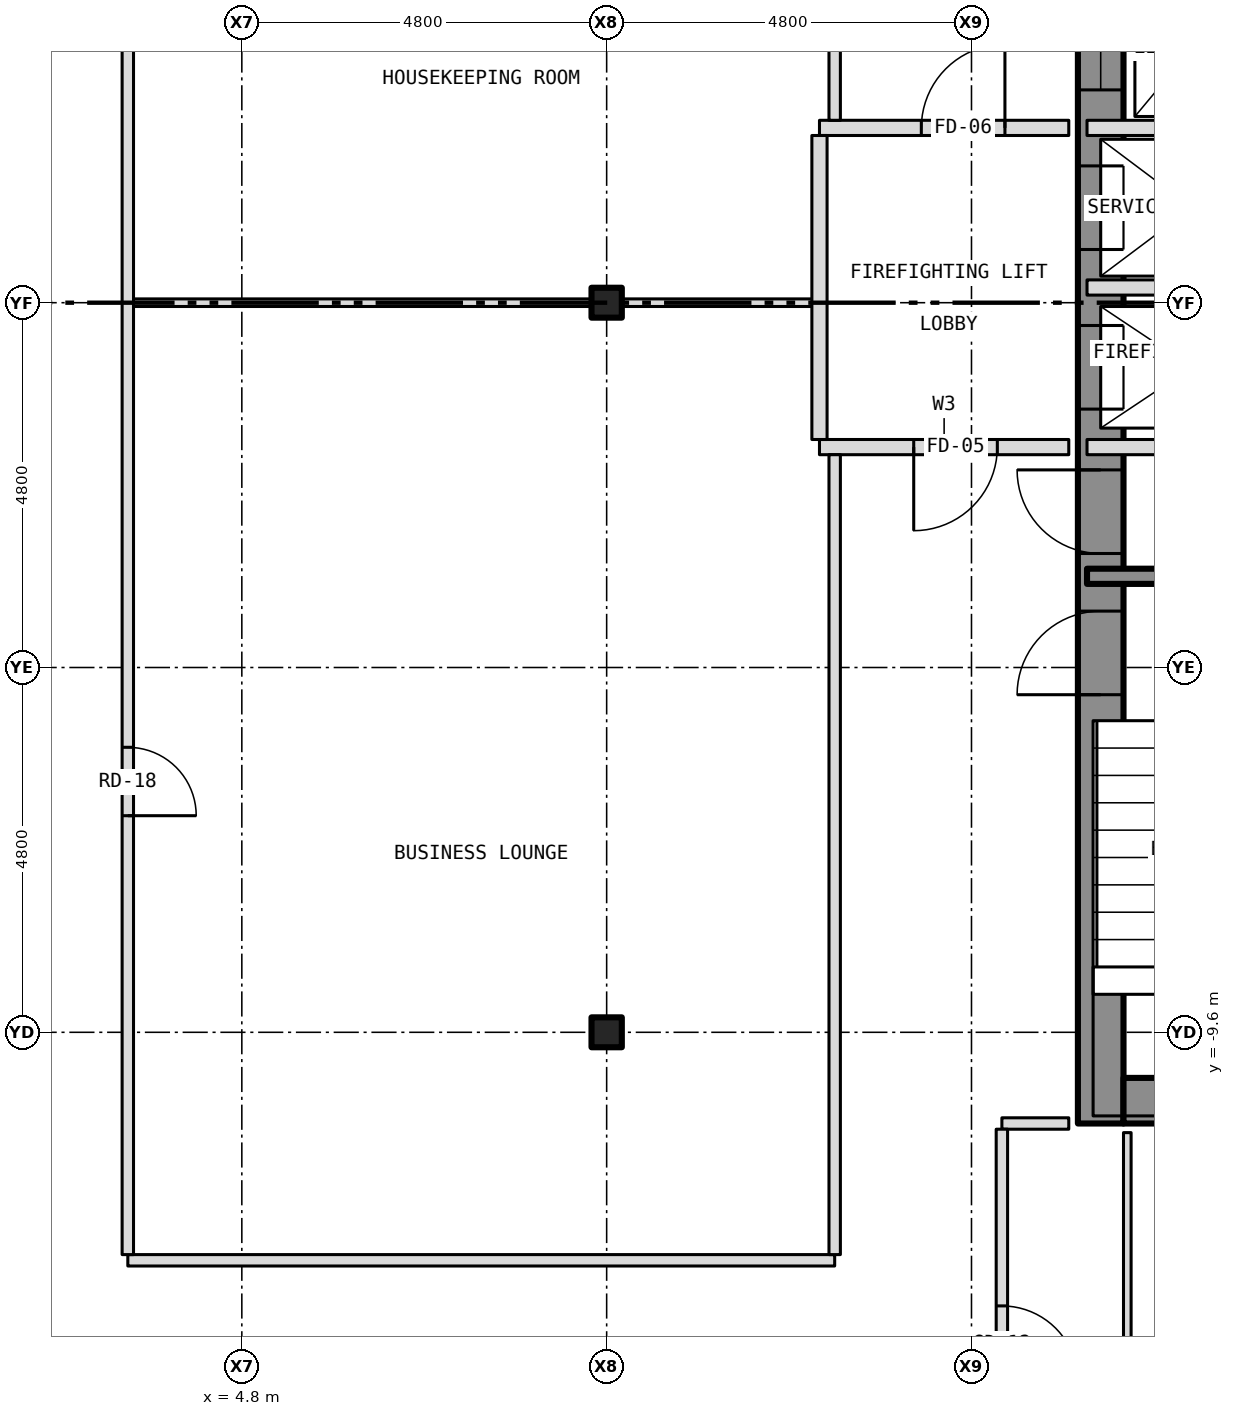
"""IFC4 building model, lengths in metres.
Left out: names, types, materials, properties, quantities, classifications, styles, units other than length and angle.
Written with IfcOpenShell. Run it as: python <this file> out.ifc"""

import sys

from ifc_helpers import new_model, si_unit, direction, frame, frame_2d, origin, origin_2d, place, context, subcontext, project, spatial, rectangle, i_section, extrude, element, fill, save


model = new_model("IFC4")
c1 = context("Model", 3, precision=1e-05, world=origin(), true_north=direction((0.0, 1.0)))
c2 = subcontext(c1, "Body", "Model", "MODEL_VIEW")
j1 = project(units=[si_unit("LENGTHUNIT", "METRE"), si_unit("PLANEANGLEUNIT", "RADIAN")], contexts=[c1])
p1 = place(None, origin())
s1 = spatial("IfcSite", under=j1, at=p1, CompositionType="ELEMENT")
p2 = place(p1, origin())
s2 = spatial("IfcBuilding", under=s1, at=p2, CompositionType="ELEMENT")
p3 = place(p2, frame((0.0, 0.0, 92.5)))
s3 = spatial("IfcBuildingStorey", under=s2, at=p3, CompositionType="ELEMENT", Elevation=92.5)
for number, where, z_axis, x_axis in (
    (1, (9.6, -9.6, -0.15), (0.0, 0.0, 1.0), (1.0, 0.0, 0.0)),
    (2, (9.6, 0.0, -0.15), (0.0, 0.0, 1.0), (1.0, 0.0, 0.0)),
):
    element("IfcColumn", number, at=place(p3, frame(where, z_axis=z_axis, x_axis=x_axis)), inside=s3, PredefinedType="COLUMN", context=c2, shape_type="SweptSolid", body=[
        extrude(i_section(OverallWidth=0.399, OverallDepth=0.394, WebThickness=0.023, FlangeThickness=0.037, at=origin_2d()), origin(), (0.0, 0.0, 1.0), 3.5),
    ])
p4 = place(p3, frame((16.1, -10.8, 0.0), z_axis=(0.0, 0.0, 1.0), x_axis=(0.0, 1.0, 0.0)))
e3 = element("IfcWall", 3, at=p4, inside=s3, PredefinedType="SHEAR", context=c2, shape_type="SweptSolid", body=[
    extrude(rectangle(XDim=21.6, YDim=0.6, at=frame_2d((10.8, 0.0))), origin(), (0.0, 0.0, 1.0), 3.25),
])
p5 = place(p4, frame((9.4, 0.0, 0.0)))
e4 = element("IfcOpeningElement", 4, at=p5, cuts=e3, PredefinedType="OPENING", context=c2, shape_type="SweptSolid", body=[
    extrude(rectangle(XDim=1.1, YDim=2.1, at=frame_2d((0.55, 1.05))), frame((0.0, 0.312, 0.0), z_axis=(0.0, -1.0, 0.0), x_axis=(1.0, 0.0, 0.0)), (0.0, 0.0, 1.0), 0.624),
])
p6 = place(p4, frame((11.5, 0.0, 0.0)))
e5 = element("IfcOpeningElement", 5, at=p6, cuts=e3, PredefinedType="OPENING", context=c2, shape_type="SweptSolid", body=[
    extrude(rectangle(XDim=1.1, YDim=2.1, at=frame_2d((0.55, 1.05))), frame((0.0, 0.312, 0.0), z_axis=(0.0, -1.0, 0.0), x_axis=(1.0, 0.0, 0.0)), (0.0, 0.0, 1.0), 0.624),
])
p7 = place(p4, frame((13.6, 0.0, 0.0)))
e6 = element("IfcOpeningElement", 6, at=p7, cuts=e3, PredefinedType="OPENING", context=c2, shape_type="SweptSolid", body=[
    extrude(rectangle(XDim=1.1, YDim=2.1, at=frame_2d((0.55, 1.05))), frame((0.0, 0.312, 0.0), z_axis=(0.0, -1.0, 0.0), x_axis=(1.0, 0.0, 0.0)), (0.0, 0.0, 1.0), 0.624),
])
p8 = place(p4, frame((15.7, 0.0, 0.0)))
e7 = element("IfcOpeningElement", 7, at=p8, cuts=e3, PredefinedType="OPENING", context=c2, shape_type="SweptSolid", body=[
    extrude(rectangle(XDim=1.1, YDim=2.1, at=frame_2d((0.55, 1.05))), frame((0.0, 0.312, 0.0), z_axis=(0.0, -1.0, 0.0), x_axis=(1.0, 0.0, 0.0)), (0.0, 0.0, 1.0), 0.624),
])
p9 = place(p4, frame((17.8, 0.0, 0.0)))
e8 = element("IfcOpeningElement", 8, at=p9, cuts=e3, PredefinedType="OPENING", context=c2, shape_type="SweptSolid", body=[
    extrude(rectangle(XDim=1.1, YDim=2.1, at=frame_2d((0.55, 1.05))), frame((0.0, 0.312, 0.0), z_axis=(0.0, -1.0, 0.0), x_axis=(1.0, 0.0, 0.0)), (0.0, 0.0, 1.0), 0.624),
])
p10 = place(p4, frame((5.642, 0.0, 0.0)))
e9 = element("IfcOpeningElement", 9, at=p10, cuts=e3, PredefinedType="OPENING", context=c2, shape_type="SweptSolid", body=[
    extrude(rectangle(XDim=1.1, YDim=2.1, at=frame_2d((0.55, 1.05))), frame((0.0, 0.312, 0.0), z_axis=(0.0, -1.0, 0.0), x_axis=(1.0, 0.0, 0.0)), (0.0, 0.0, 1.0), 0.624),
])
p11 = place(p4, frame((7.5, 0.0, 0.0)))
e10 = element("IfcOpeningElement", 10, at=p11, cuts=e3, PredefinedType="OPENING", context=c2, shape_type="SweptSolid", body=[
    extrude(rectangle(XDim=1.1, YDim=2.1, at=frame_2d((0.55, 1.05))), frame((0.0, 0.312, 0.0), z_axis=(0.0, -1.0, 0.0), x_axis=(1.0, 0.0, 0.0)), (0.0, 0.0, 1.0), 0.624),
])
p12 = place(p3, frame((16.4, -10.5, 0.0), z_axis=(0.0, 0.0, 1.0), x_axis=(1.0, 0.0, 0.0)))
e11 = element("IfcWall", 11, at=p12, inside=s3, PredefinedType="SHEAR", context=c2, shape_type="SweptSolid", body=[
    extrude(rectangle(XDim=5.8, YDim=0.6, at=frame_2d((2.9, 0.0))), origin(), (0.0, 0.0, 1.0), 3.25),
])
p13 = place(p3, frame((3.3, -12.6, 0.0), z_axis=(0.0, 0.0, 1.0), x_axis=(1.0, 0.0, 0.0)))
e12 = element("IfcWall", 12, at=p13, inside=s3, PredefinedType="PARTITIONING", context=c2, shape_type="SweptSolid", body=[
    extrude(rectangle(XDim=9.3, YDim=0.15, at=frame_2d((4.65, 0.0))), origin(), (0.0, 0.0, 1.0), 3.35),
])
p14 = place(p3, frame((14.8, -10.8, 0.0), z_axis=(0.0, 0.0, 1.0), x_axis=(1.0, 0.0, 0.0)))
e13 = element("IfcWall", 13, at=p14, inside=s3, PredefinedType="PARTITIONING", context=c2, shape_type="SweptSolid", body=[
    extrude(rectangle(XDim=0.88, YDim=0.15, at=frame_2d((0.44, 0.0))), origin(), (0.0, 0.0, 1.0), 3.35),
])
p15 = place(p3, frame((15.92, -3.6, 0.0), z_axis=(0.0, 0.0, 1.0), x_axis=(1.0, 0.0, 0.0)))
e14 = element("IfcWall", 14, at=p15, inside=s3, PredefinedType="SHEAR", context=c2, shape_type="SweptSolid", body=[
    extrude(rectangle(XDim=4.08, YDim=0.2, at=frame_2d((2.04, 0.0))), origin(), (0.0, 0.0, 1.0), 3.25),
])
p16 = place(p3, frame((12.4, -1.9, 0.0), z_axis=(0.0, 0.0, 1.0), x_axis=(1.0, 0.0, 0.0)))
e15 = element("IfcWall", 15, at=p16, inside=s3, PredefinedType="PARTITIONING", context=c2, shape_type="SweptSolid", body=[
    extrude(rectangle(XDim=3.28, YDim=0.2, at=frame_2d((1.64, 0.0))), origin(), (0.0, 0.0, 1.0), 3.35),
])
p17 = place(p16, frame((1.24, 0.0, 0.0)))
e16 = element("IfcOpeningElement", 16, at=p17, cuts=e15, PredefinedType="OPENING", context=c2, shape_type="SweptSolid", body=[
    extrude(rectangle(XDim=1.1, YDim=2.1, at=frame_2d((0.55, 1.05))), frame((0.0, 0.112, 0.0), z_axis=(0.0, -1.0, 0.0), x_axis=(1.0, 0.0, 0.0)), (0.0, 0.0, 1.0), 0.224),
])
p18 = place(p3, frame((15.92, -1.9, 0.0), z_axis=(0.0, 0.0, 1.0), x_axis=(1.0, 0.0, 0.0)))
e17 = element("IfcWall", 17, at=p18, inside=s3, PredefinedType="PARTITIONING", context=c2, shape_type="SweptSolid", body=[
    extrude(rectangle(XDim=6.76, YDim=0.2, at=frame_2d((3.38, 0.0))), origin(), (0.0, 0.0, 1.0), 3.25),
])
p19 = place(p18, frame((3.74, 0.0, 0.0)))
e18 = element("IfcOpeningElement", 18, at=p19, cuts=e17, PredefinedType="OPENING", context=c2, shape_type="SweptSolid", body=[
    extrude(rectangle(XDim=0.9, YDim=2.1, at=frame_2d((0.45, 1.05))), frame((0.0, 0.112, 0.0), z_axis=(0.0, -1.0, 0.0), x_axis=(1.0, 0.0, 0.0)), (0.0, 0.0, 1.0), 0.224),
])
p20 = place(p3, frame((3.3, 0.0, 0.0), z_axis=(0.0, 0.0, 1.0), x_axis=(1.0, 0.0, 0.0)))
e19 = element("IfcWall", 19, at=p20, inside=s3, PredefinedType="PARTITIONING", context=c2, shape_type="SweptSolid", body=[
    extrude(rectangle(XDim=6.101, YDim=0.1, at=frame_2d((3.05, 0.0))), origin(), (0.0, 0.0, 1.0), 2.728),
])
p21 = place(p3, frame((9.401, 0.0, 0.0), z_axis=(0.0, 0.0, 1.0), x_axis=(1.0, 0.0, 0.0)))
e20 = element("IfcWall", 20, at=p21, inside=s3, PredefinedType="PARTITIONING", context=c2, shape_type="SweptSolid", body=[
    extrude(rectangle(XDim=0.398, YDim=0.1, at=frame_2d((0.199, 0.0))), origin(), (0.0, 0.0, 1.0), 3.35),
])
p22 = place(p3, frame((9.799, 0.0, 0.0), z_axis=(0.0, 0.0, 1.0), x_axis=(1.0, 0.0, 0.0)))
e21 = element("IfcWall", 21, at=p22, inside=s3, PredefinedType="PARTITIONING", context=c2, shape_type="SweptSolid", body=[
    extrude(rectangle(XDim=2.601, YDim=0.1, at=frame_2d((1.3, 0.0))), origin(), (0.0, 0.0, 1.0), 2.728),
])
p23 = place(p3, frame((15.92, 0.2, 0.0), z_axis=(0.0, 0.0, 1.0), x_axis=(1.0, 0.0, 0.0)))
e22 = element("IfcWall", 22, at=p23, inside=s3, PredefinedType="PARTITIONING", context=c2, shape_type="SweptSolid", body=[
    extrude(rectangle(XDim=2.88, YDim=0.2, at=frame_2d((1.44, 0.0))), origin(), (0.0, 0.0, 1.0), 3.25),
])
p24 = place(p3, frame((12.4, 2.3, 0.0), z_axis=(0.0, 0.0, 1.0), x_axis=(1.0, 0.0, 0.0)))
e23 = element("IfcWall", 23, at=p24, inside=s3, PredefinedType="PARTITIONING", context=c2, shape_type="SweptSolid", body=[
    extrude(rectangle(XDim=3.28, YDim=0.2, at=frame_2d((1.64, 0.0))), origin(), (0.0, 0.0, 1.0), 3.35),
])
p25 = place(p24, frame((1.34, 0.0, 0.0)))
e24 = element("IfcOpeningElement", 24, at=p25, cuts=e23, PredefinedType="OPENING", context=c2, shape_type="SweptSolid", body=[
    extrude(rectangle(XDim=1.1, YDim=2.1, at=frame_2d((0.55, 1.05))), frame((0.0, 0.112, 0.0), z_axis=(0.0, -1.0, 0.0), x_axis=(1.0, 0.0, 0.0)), (0.0, 0.0, 1.0), 0.224),
])
p26 = place(p3, frame((15.92, 2.3, 0.0), z_axis=(0.0, 0.0, 1.0), x_axis=(1.0, 0.0, 0.0)))
e25 = element("IfcWall", 25, at=p26, inside=s3, PredefinedType="PARTITIONING", context=c2, shape_type="SweptSolid", body=[
    extrude(rectangle(XDim=2.88, YDim=0.2, at=frame_2d((1.44, 0.0))), origin(), (0.0, 0.0, 1.0), 3.25),
])
p27 = place(p3, frame((3.3, -12.525, 0.0), z_axis=(0.0, 0.0, 1.0), x_axis=(0.0, 1.0, 0.0)))
e26 = element("IfcWall", 26, at=p27, inside=s3, PredefinedType="PARTITIONING", context=c2, shape_type="SweptSolid", body=[
    extrude(rectangle(XDim=18.35, YDim=0.15, at=frame_2d((9.175, 0.0))), origin(), (0.0, 0.0, 1.0), 3.35),
])
p28 = place(p27, frame((5.775, 0.0, 0.0)))
e27 = element("IfcOpeningElement", 27, at=p28, cuts=e26, PredefinedType="OPENING", context=c2, shape_type="SweptSolid", body=[
    extrude(rectangle(XDim=0.9, YDim=2.1, at=frame_2d((0.45, 1.05))), frame((0.0, 0.087, 0.0), z_axis=(0.0, -1.0, 0.0), x_axis=(1.0, 0.0, 0.0)), (0.0, 0.0, 1.0), 0.174),
])
p29 = place(p3, frame((12.4, -1.8, 0.0), z_axis=(0.0, 0.0, 1.0), x_axis=(0.0, 1.0, 0.0)))
e28 = element("IfcWall", 28, at=p29, inside=s3, PredefinedType="PARTITIONING", context=c2, shape_type="SweptSolid", body=[
    extrude(rectangle(XDim=4.0, YDim=0.2, at=frame_2d((2.0, 0.0))), origin(), (0.0, 0.0, 1.0), 3.35),
])
p30 = place(p3, frame((12.6, -12.525, 0.0), z_axis=(0.0, 0.0, 1.0), x_axis=(0.0, 1.0, 0.0)))
e29 = element("IfcWall", 29, at=p30, inside=s3, PredefinedType="PARTITIONING", context=c2, shape_type="SweptSolid", body=[
    extrude(rectangle(XDim=10.525, YDim=0.15, at=frame_2d((5.262, 0.0))), origin(), (0.0, 0.0, 1.0), 3.35),
])
p31 = place(p3, frame((12.6, 2.4, 0.0), z_axis=(0.0, 0.0, 1.0), x_axis=(0.0, 1.0, 0.0)))
e30 = element("IfcWall", 30, at=p31, inside=s3, PredefinedType="PARTITIONING", context=c2, shape_type="SweptSolid", body=[
    extrude(rectangle(XDim=3.425, YDim=0.15, at=frame_2d((1.712, 0.0))), origin(), (0.0, 0.0, 1.0), 3.35),
])
p32 = place(p3, frame((14.8, -14.725, 0.0), z_axis=(0.0, 0.0, 1.0), x_axis=(0.0, 1.0, 0.0)))
e31 = element("IfcWall", 31, at=p32, inside=s3, PredefinedType="PARTITIONING", context=c2, shape_type="SweptSolid", body=[
    extrude(rectangle(XDim=3.85, YDim=0.15, at=frame_2d((1.925, 0.0))), origin(), (0.0, 0.0, 1.0), 3.35),
])
p33 = place(p32, frame((0.525, 0.0, 0.0)))
e32 = element("IfcOpeningElement", 32, at=p33, cuts=e31, PredefinedType="OPENING", context=c2, shape_type="SweptSolid", body=[
    extrude(rectangle(XDim=1.0, YDim=2.1, at=frame_2d((0.5, 1.05))), frame((0.0, 0.087, 0.0), z_axis=(0.0, -1.0, 0.0), x_axis=(1.0, 0.0, 0.0)), (0.0, 0.0, 1.0), 0.174),
])
p34 = place(p3, frame((16.45, -23.28, 0.0), z_axis=(0.0, 0.0, 1.0), x_axis=(0.0, 1.0, 0.0)))
e33 = element("IfcWall", 33, at=p34, inside=s3, PredefinedType="PARTITIONING", context=c2, shape_type="SweptSolid", body=[
    extrude(rectangle(XDim=12.36, YDim=0.1, at=frame_2d((6.18, 0.0))), origin(), (0.0, 0.0, 1.0), 3.35),
])
p35 = place(p34, frame((6.03, 0.0, 0.0)))
e34 = element("IfcOpeningElement", 34, at=p35, cuts=e33, PredefinedType="OPENING", context=c2, shape_type="SweptSolid", body=[
    extrude(rectangle(XDim=0.9, YDim=2.1, at=frame_2d((0.45, 1.05))), frame((0.0, 0.062, 0.0), z_axis=(0.0, -1.0, 0.0), x_axis=(1.0, 0.0, 0.0)), (0.0, 0.0, 1.0), 0.124),
])
p36 = place(p5, origin())
e35 = element("IfcDoor", 35, at=p36, inside=s3, OperationType="SLIDING_TO_LEFT", PredefinedType="DOOR", context=c2, shape_type="SweptSolid", body=[
    extrude(rectangle(XDim=1.1, YDim=2.1, at=frame_2d((0.55, 1.05))), frame((0.0, 0.025, 0.0), z_axis=(0.0, -1.0, 0.0), x_axis=(1.0, 0.0, 0.0)), (0.0, 0.0, 1.0), 0.05),
])
fill(e4, e35)
p37 = place(p6, origin())
e36 = element("IfcDoor", 36, at=p37, inside=s3, OperationType="SLIDING_TO_LEFT", PredefinedType="DOOR", context=c2, shape_type="SweptSolid", body=[
    extrude(rectangle(XDim=1.1, YDim=2.1, at=frame_2d((0.55, 1.05))), frame((0.0, 0.025, 0.0), z_axis=(0.0, -1.0, 0.0), x_axis=(1.0, 0.0, 0.0)), (0.0, 0.0, 1.0), 0.05),
])
fill(e5, e36)
p38 = place(p7, origin())
e37 = element("IfcDoor", 37, at=p38, inside=s3, OperationType="SLIDING_TO_LEFT", PredefinedType="DOOR", context=c2, shape_type="SweptSolid", body=[
    extrude(rectangle(XDim=1.1, YDim=2.1, at=frame_2d((0.55, 1.05))), frame((0.0, 0.025, 0.0), z_axis=(0.0, -1.0, 0.0), x_axis=(1.0, 0.0, 0.0)), (0.0, 0.0, 1.0), 0.05),
])
fill(e6, e37)
p39 = place(p10, origin())
e38 = element("IfcDoor", 38, at=p39, inside=s3, OperationType="SINGLE_SWING_LEFT", PredefinedType="DOOR", context=c2, shape_type="SweptSolid", body=[
    extrude(rectangle(XDim=1.1, YDim=2.1, at=frame_2d((0.55, 1.05))), frame((0.0, 0.025, 0.0), z_axis=(0.0, -1.0, 0.0), x_axis=(1.0, 0.0, 0.0)), (0.0, 0.0, 1.0), 0.05),
])
fill(e9, e38)
p40 = place(p11, origin())
e39 = element("IfcDoor", 39, at=p40, inside=s3, OperationType="SINGLE_SWING_RIGHT", PredefinedType="DOOR", context=c2, shape_type="SweptSolid", body=[
    extrude(rectangle(XDim=1.1, YDim=2.1, at=frame_2d((0.55, 1.05))), frame((0.0, 0.025, 0.0), z_axis=(0.0, -1.0, 0.0), x_axis=(1.0, 0.0, 0.0)), (0.0, 0.0, 1.0), 0.05),
])
fill(e10, e39)
p41 = place(p17, origin())
e40 = element("IfcDoor", 40, at=p41, inside=s3, OperationType="SINGLE_SWING_LEFT", PredefinedType="DOOR", context=c2, shape_type="SweptSolid", body=[
    extrude(rectangle(XDim=1.1, YDim=2.1, at=frame_2d((0.55, 1.05))), frame((0.0, 0.025, 0.0), z_axis=(0.0, -1.0, 0.0), x_axis=(1.0, 0.0, 0.0)), (0.0, 0.0, 1.0), 0.05),
])
fill(e16, e40)
p42 = place(p25, origin())
e41 = element("IfcDoor", 41, at=p42, inside=s3, OperationType="SINGLE_SWING_RIGHT", PredefinedType="DOOR", context=c2, shape_type="SweptSolid", body=[
    extrude(rectangle(XDim=1.1, YDim=2.1, at=frame_2d((0.55, 1.05))), frame((0.0, 0.025, 0.0), z_axis=(0.0, -1.0, 0.0), x_axis=(1.0, 0.0, 0.0)), (0.0, 0.0, 1.0), 0.05),
])
fill(e24, e41)
p43 = place(p33, origin())
e42 = element("IfcDoor", 42, at=p43, inside=s3, OperationType="SINGLE_SWING_LEFT", PredefinedType="DOOR", context=c2, shape_type="SweptSolid", body=[
    extrude(rectangle(XDim=1.0, YDim=2.1, at=frame_2d((0.5, 1.05))), frame((0.0, 0.025, 0.0), z_axis=(0.0, -1.0, 0.0), x_axis=(1.0, 0.0, 0.0)), (0.0, 0.0, 1.0), 0.05),
])
fill(e32, e42)
p44 = place(p28, origin())
e43 = element("IfcDoor", 43, at=p44, inside=s3, OperationType="SINGLE_SWING_LEFT", PredefinedType="DOOR", context=c2, shape_type="SweptSolid", body=[
    extrude(rectangle(XDim=0.9, YDim=2.1, at=frame_2d((0.45, 1.05))), frame((0.0, 0.025, 0.0), z_axis=(0.0, -1.0, 0.0), x_axis=(1.0, 0.0, 0.0)), (0.0, 0.0, 1.0), 0.05),
])
fill(e27, e43)
save(model, sys.argv[1])
